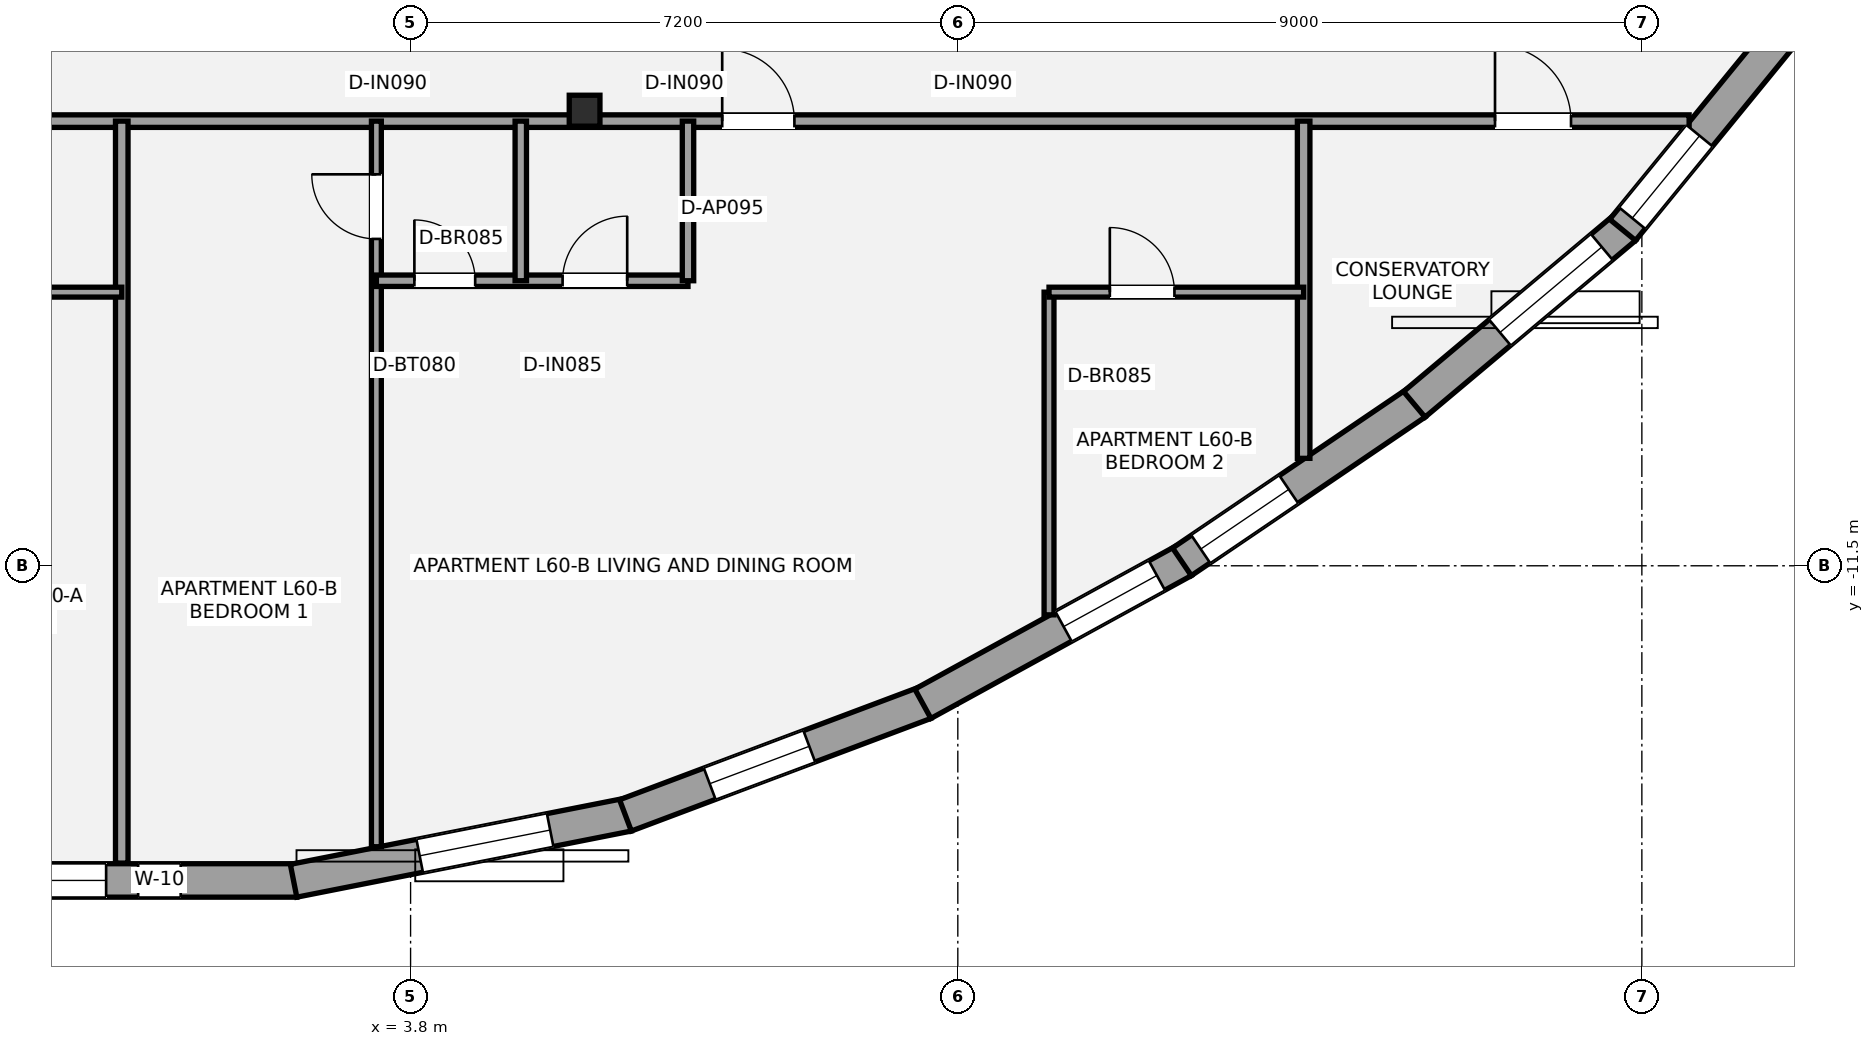
"""IFC4 building model, lengths in metres.
Left out: names, types, materials, properties, quantities, classifications, styles, units other than length and angle.
Written with IfcOpenShell. Run it as: python <this file> out.ifc"""

import sys

from ifc_helpers import new_model, si_unit, direction, frame, frame_2d, origin, origin_2d, place, context, subcontext, project, spatial, rectangle, i_section, extrude, element, fill, save


model = new_model("IFC4")
c1 = context("Model", 3, precision=1e-05, world=origin(), true_north=direction((0.0, 1.0)))
c2 = subcontext(c1, "Body", "Model", "MODEL_VIEW")
j1 = project(units=[si_unit("LENGTHUNIT", "METRE"), si_unit("PLANEANGLEUNIT", "RADIAN")], contexts=[c1])
p1 = place(None, origin())
s1 = spatial("IfcSite", under=j1, at=p1, CompositionType="ELEMENT")
p2 = place(p1, origin())
s2 = spatial("IfcBuilding", under=s1, at=p2, CompositionType="ELEMENT")
p3 = place(p2, frame((0.0, 0.0, 216.3)))
s3 = spatial("IfcBuildingStorey", under=s2, at=p3, CompositionType="ELEMENT", Elevation=216.3)
p4 = place(p3, frame((6.09, -5.513, 0.0), z_axis=(0.0, 0.0, 1.0), x_axis=(1.0, 0.0, 0.0)))
e1 = element("IfcColumn", 1, at=p4, inside=s3, PredefinedType="COLUMN", context=c2, shape_type="SweptSolid", body=[
    extrude(i_section(OverallWidth=0.404, OverallDepth=0.407, WebThickness=0.027, FlangeThickness=0.044, at=origin_2d()), origin(), (0.0, 0.0, 1.0), 3.15),
])
p5 = place(p3, frame((2.303, -15.64, 0.0), z_axis=(0.0, 0.0, 1.0), x_axis=(-1.0, 0.0, 0.0)))
e2 = element("IfcWall", 2, at=p5, inside=s3, PredefinedType="STANDARD", context=c2, shape_type="SweptSolid", body=[
    extrude(rectangle(XDim=4.606, YDim=0.44, at=frame_2d((2.303, 0.0))), origin(), (0.0, 0.0, 1.0), 2.336),
])
p6 = place(p5, frame((2.509, 0.0, 0.55)))
e3 = element("IfcOpeningElement", 3, at=p6, cuts=e2, PredefinedType="OPENING", context=c2, shape_type="SweptSolid", body=[
    extrude(rectangle(XDim=1.75, YDim=1.55, at=frame_2d((0.875, 0.775))), frame((0.0, 0.23, 0.0), z_axis=(0.0, -1.0, 0.0), x_axis=(1.0, 0.0, 0.0)), (0.0, 0.0, 1.0), 0.46),
])
p7 = place(p5, frame((1.528, 0.0, 0.42)))
e4 = element("IfcOpeningElement", 4, at=p7, cuts=e2, PredefinedType="OPENING", context=c2, shape_type="SweptSolid", body=[
    extrude(rectangle(XDim=0.56, YDim=1.15, at=frame_2d((0.28, 0.575))), frame((0.0, 0.23, 0.0), z_axis=(0.0, -1.0, 0.0), x_axis=(1.0, 0.0, 0.0)), (0.0, 0.0, 1.0), 0.46),
])
p8 = place(p3, frame((6.662, -14.774, 0.0), z_axis=(0.0, 0.0, 1.0), x_axis=(-0.981032244947, -0.193844613996, 0.0)))
e5 = element("IfcWall", 5, at=p8, inside=s3, PredefinedType="STANDARD", context=c2, shape_type="SweptSolid", body=[
    extrude(rectangle(XDim=4.486, YDim=0.44, at=frame_2d((2.243, 0.0))), origin(), (0.0, 0.0, 1.0), 2.336),
])
p9 = place(p8, frame((1.045, 0.0, 0.55)))
e6 = element("IfcOpeningElement", 6, at=p9, cuts=e5, PredefinedType="OPENING", context=c2, shape_type="SweptSolid", body=[
    extrude(rectangle(XDim=1.75, YDim=1.55, at=frame_2d((0.875, 0.775))), frame((0.0, 0.23, 0.0), z_axis=(0.0, -1.0, 0.0), x_axis=(1.0, 0.0, 0.0)), (0.0, 0.0, 1.0), 0.46),
])
p10 = place(p3, frame((10.569, -13.302, 0.0), z_axis=(0.0, 0.0, 1.0), x_axis=(-0.936069207768, -0.351815915314, 0.0)))
e7 = element("IfcWall", 7, at=p10, inside=s3, PredefinedType="STANDARD", context=c2, shape_type="SweptSolid", body=[
    extrude(rectangle(XDim=4.211, YDim=0.44, at=frame_2d((2.105, 0.0))), origin(), (0.0, 0.0, 1.0), 2.336),
])
p11 = place(p10, frame((1.627, 0.0, 0.55)))
e8 = element("IfcOpeningElement", 8, at=p11, cuts=e7, PredefinedType="OPENING", context=c2, shape_type="SweptSolid", body=[
    extrude(rectangle(XDim=1.4, YDim=1.55, at=frame_2d((0.7, 0.775))), frame((0.0, 0.23, 0.0), z_axis=(0.0, -1.0, 0.0), x_axis=(1.0, 0.0, 0.0)), (0.0, 0.0, 1.0), 0.46),
])
p12 = place(p3, frame((13.967, -11.437, 0.0), z_axis=(0.0, 0.0, 1.0), x_axis=(-0.87688122565, -0.480707100117, 0.0)))
e9 = element("IfcWall", 9, at=p12, inside=s3, PredefinedType="STANDARD", context=c2, shape_type="SweptSolid", body=[
    extrude(rectangle(XDim=3.908, YDim=0.44, at=frame_2d((1.954, 0.0))), origin(), (0.0, 0.0, 1.0), 2.336),
])
p13 = place(p12, frame((0.396, 0.0, 0.58)))
e10 = element("IfcOpeningElement", 10, at=p13, cuts=e9, PredefinedType="OPENING", context=c2, shape_type="SweptSolid", body=[
    extrude(rectangle(XDim=1.4, YDim=1.55, at=frame_2d((0.7, 0.775))), frame((0.0, 0.23, 0.0), z_axis=(0.0, -1.0, 0.0), x_axis=(1.0, 0.0, 0.0)), (0.0, 0.0, 1.0), 0.46),
])
p14 = place(p3, frame((17.024, -9.362, 0.0), z_axis=(0.0, 0.0, 1.0), x_axis=(-0.827595704154, -0.561324639105, 0.0)))
e11 = element("IfcWall", 11, at=p14, inside=s3, PredefinedType="STANDARD", context=c2, shape_type="SweptSolid", body=[
    extrude(rectangle(XDim=3.715, YDim=0.44, at=frame_2d((1.858, 0.0))), origin(), (0.0, 0.0, 1.0), 2.336),
])
p15 = place(p14, frame((2.017, 0.0, 0.58)))
e12 = element("IfcOpeningElement", 12, at=p15, cuts=e11, PredefinedType="OPENING", context=c2, shape_type="SweptSolid", body=[
    extrude(rectangle(XDim=1.4, YDim=1.55, at=frame_2d((0.7, 0.775))), frame((0.0, 0.23, 0.0), z_axis=(0.0, -1.0, 0.0), x_axis=(1.0, 0.0, 0.0)), (0.0, 0.0, 1.0), 0.46),
])
p16 = place(p3, frame((19.776, -7.052, 0.0), z_axis=(0.0, 0.0, 1.0), x_axis=(-0.766063904081, -0.642764416302, 0.0)))
e13 = element("IfcWall", 13, at=p16, inside=s3, PredefinedType="STANDARD", context=c2, shape_type="SweptSolid", body=[
    extrude(rectangle(XDim=3.615, YDim=0.44, at=frame_2d((1.808, 0.0))), origin(), (0.0, 0.0, 1.0), 2.336),
])
p17 = place(p16, frame((0.396, 0.0, 0.55)))
e14 = element("IfcOpeningElement", 14, at=p17, cuts=e13, PredefinedType="OPENING", context=c2, shape_type="SweptSolid", body=[
    extrude(rectangle(XDim=1.75, YDim=1.55, at=frame_2d((0.875, 0.775))), frame((0.0, 0.23, 0.0), z_axis=(0.0, -1.0, 0.0), x_axis=(1.0, 0.0, 0.0)), (0.0, 0.0, 1.0), 0.46),
])
p18 = place(p3, frame((21.931, -4.408, 0.0), z_axis=(0.0, 0.0, 1.0), x_axis=(-0.632725461905, -0.774376194015, 0.0)))
e15 = element("IfcWall", 15, at=p18, inside=s3, PredefinedType="STANDARD", context=c2, shape_type="SweptSolid", body=[
    extrude(rectangle(XDim=3.452, YDim=0.44, at=frame_2d((1.726, 0.0))), origin(), (0.0, 0.0, 1.0), 2.336),
])
p19 = place(p18, frame((1.852, 0.0, 0.58)))
e16 = element("IfcOpeningElement", 16, at=p19, cuts=e15, PredefinedType="OPENING", context=c2, shape_type="SweptSolid", body=[
    extrude(rectangle(XDim=1.4, YDim=1.55, at=frame_2d((0.7, 0.775))), frame((0.0, 0.23, 0.0), z_axis=(0.0, -1.0, 0.0), x_axis=(1.0, 0.0, 0.0)), (0.0, 0.0, 1.0), 0.46),
])
p20 = place(p3, frame((-20.622, -5.65, 0.0), z_axis=(0.0, 0.0, 1.0), x_axis=(1.0, 0.0, 0.0)))
e17 = element("IfcWall", 17, at=p20, inside=s3, PredefinedType="PARTITIONING", context=c2, shape_type="SweptSolid", body=[
    extrude(rectangle(XDim=41.244, YDim=0.165, at=frame_2d((20.622, 0.0))), origin(), (0.0, 0.0, 1.0), 2.357),
])
p21 = place(p20, frame((1.554, 0.0, 0.0)))
e18 = element("IfcOpeningElement", 18, at=p21, cuts=e17, PredefinedType="OPENING", context=c2, shape_type="SweptSolid", body=[
    extrude(rectangle(XDim=1.0, YDim=2.15, at=frame_2d((0.5, 1.075))), frame((0.0, 0.093, 0.0), z_axis=(0.0, -1.0, 0.0), x_axis=(1.0, 0.0, 0.0)), (0.0, 0.0, 1.0), 0.185),
])
p22 = place(p20, frame((38.69, 0.0, 0.0)))
e19 = element("IfcOpeningElement", 19, at=p22, cuts=e17, PredefinedType="OPENING", context=c2, shape_type="SweptSolid", body=[
    extrude(rectangle(XDim=1.0, YDim=2.15, at=frame_2d((0.5, 1.075))), frame((0.0, 0.093, 0.0), z_axis=(0.0, -1.0, 0.0), x_axis=(1.0, 0.0, 0.0)), (0.0, 0.0, 1.0), 0.185),
])
p23 = place(p20, frame((14.932, 0.0, 0.0)))
e20 = element("IfcOpeningElement", 20, at=p23, cuts=e17, PredefinedType="OPENING", context=c2, shape_type="SweptSolid", body=[
    extrude(rectangle(XDim=0.95, YDim=2.15, at=frame_2d((0.475, 1.075))), frame((0.0, 0.093, 0.0), z_axis=(0.0, -1.0, 0.0), x_axis=(1.0, 0.0, 0.0)), (0.0, 0.0, 1.0), 0.185),
])
p24 = place(p20, frame((28.522, 0.0, 0.0)))
e21 = element("IfcOpeningElement", 21, at=p24, cuts=e17, PredefinedType="OPENING", context=c2, shape_type="SweptSolid", body=[
    extrude(rectangle(XDim=0.95, YDim=2.15, at=frame_2d((0.475, 1.075))), frame((0.0, 0.093, 0.0), z_axis=(0.0, -1.0, 0.0), x_axis=(1.0, 0.0, 0.0)), (0.0, 0.0, 1.0), 0.185),
])
p25 = place(p3, frame((15.55, -10.086, 0.0), z_axis=(0.0, 0.0, 1.0), x_axis=(0.0, 1.0, 0.0)))
e22 = element("IfcWall", 22, at=p25, inside=s3, PredefinedType="PARTITIONING", context=c2, shape_type="SweptSolid", body=[
    extrude(rectangle(XDim=4.437, YDim=0.165, at=frame_2d((2.218, 0.0))), origin(), (0.0, 0.0, 1.0), 2.97),
])
p26 = place(p3, frame((0.0, -15.412, 0.0), z_axis=(0.0, 0.0, 1.0), x_axis=(0.0, 1.0, 0.0)))
e23 = element("IfcWall", 23, at=p26, inside=s3, PredefinedType="PARTITIONING", context=c2, shape_type="SweptSolid", body=[
    extrude(rectangle(XDim=9.762, YDim=0.165, at=frame_2d((4.881, 0.0))), origin(), (0.0, 0.0, 1.0), 2.423),
])
p27 = place(p3, frame((-3.35, -7.9, 0.0), z_axis=(0.0, 0.0, 1.0), x_axis=(1.0, 0.0, 0.0)))
e24 = element("IfcWall", 24, at=p27, inside=s3, PredefinedType="PARTITIONING", context=c2, shape_type="SweptSolid", body=[
    extrude(rectangle(XDim=3.35, YDim=0.13, at=frame_2d((1.675, 0.0))), origin(), (0.0, 0.0, 1.0), 2.423),
])
p28 = place(p27, frame((0.8, 0.0, 0.0)))
e25 = element("IfcOpeningElement", 25, at=p28, cuts=e24, PredefinedType="OPENING", context=c2, shape_type="SweptSolid", body=[
    extrude(rectangle(XDim=0.85, YDim=2.1, at=frame_2d((0.425, 1.05))), frame((0.0, 0.075, 0.0), z_axis=(0.0, -1.0, 0.0), x_axis=(1.0, 0.0, 0.0)), (0.0, 0.0, 1.0), 0.15),
])
p29 = place(p3, frame((3.35, -15.196, 0.0), z_axis=(0.0, 0.0, 1.0), x_axis=(0.0, 1.0, 0.0)))
e26 = element("IfcWall", 26, at=p29, inside=s3, PredefinedType="PARTITIONING", context=c2, shape_type="SweptSolid", body=[
    extrude(rectangle(XDim=9.546, YDim=0.13, at=frame_2d((4.773, 0.0))), origin(), (0.0, 0.0, 1.0), 2.423),
])
p30 = place(p29, frame((7.996, 0.0, 0.0)))
e27 = element("IfcOpeningElement", 27, at=p30, cuts=e26, PredefinedType="OPENING", context=c2, shape_type="SweptSolid", body=[
    extrude(rectangle(XDim=0.85, YDim=2.1, at=frame_2d((0.425, 1.05))), frame((0.0, 0.075, 0.0), z_axis=(0.0, -1.0, 0.0), x_axis=(1.0, 0.0, 0.0)), (0.0, 0.0, 1.0), 0.15),
])
p31 = place(p3, frame((3.35, -7.75, 0.0), z_axis=(0.0, 0.0, 1.0), x_axis=(1.0, 0.0, 0.0)))
e28 = element("IfcWall", 28, at=p31, inside=s3, PredefinedType="PLUMBINGWALL", context=c2, shape_type="SweptSolid", body=[
    extrude(rectangle(XDim=4.1, YDim=0.15, at=frame_2d((2.05, 0.0))), origin(), (0.0, 0.0, 1.0), 2.97),
])
p32 = place(p31, frame((0.5, 0.0, 0.0)))
e29 = element("IfcOpeningElement", 29, at=p32, cuts=e28, PredefinedType="OPENING", context=c2, shape_type="SweptSolid", body=[
    extrude(rectangle(XDim=0.8, YDim=2.1, at=frame_2d((0.4, 1.05))), frame((0.0, 0.085, 0.0), z_axis=(0.0, -1.0, 0.0), x_axis=(1.0, 0.0, 0.0)), (0.0, 0.0, 1.0), 0.17),
])
p33 = place(p31, frame((2.45, 0.0, 0.0)))
e30 = element("IfcOpeningElement", 30, at=p33, cuts=e28, PredefinedType="OPENING", context=c2, shape_type="SweptSolid", body=[
    extrude(rectangle(XDim=0.85, YDim=2.1, at=frame_2d((0.425, 1.05))), frame((0.0, 0.085, 0.0), z_axis=(0.0, -1.0, 0.0), x_axis=(1.0, 0.0, 0.0)), (0.0, 0.0, 1.0), 0.17),
])
for number, where, z_axis, x_axis in (
    (31, (5.25, -7.75, 0.0), (0.0, 0.0, 1.0), (0.0, 1.0, 0.0)),
    (32, (7.45, -7.75, 0.0), (0.0, 0.0, 1.0), (0.0, 1.0, 0.0)),
):
    element("IfcWall", number, at=place(p3, frame(where, z_axis=z_axis, x_axis=x_axis)), inside=s3, PredefinedType="PLUMBINGWALL", context=c2, shape_type="SweptSolid", body=[
        extrude(rectangle(XDim=2.1, YDim=0.15, at=frame_2d((1.05, 0.0))), origin(), (0.0, 0.0, 1.0), 2.97),
    ])
p34 = place(p3, frame((12.2, -12.146, 0.0), z_axis=(0.0, 0.0, 1.0), x_axis=(0.0, 1.0, 0.0)))
e33 = element("IfcWall", 33, at=p34, inside=s3, PredefinedType="PARTITIONING", context=c2, shape_type="SweptSolid", body=[
    extrude(rectangle(XDim=4.246, YDim=0.13, at=frame_2d((2.123, 0.0))), origin(), (0.0, 0.0, 1.0), 2.423),
])
p35 = place(p3, frame((12.2, -7.9, 0.0), z_axis=(0.0, 0.0, 1.0), x_axis=(1.0, 0.0, 0.0)))
e34 = element("IfcWall", 34, at=p35, inside=s3, PredefinedType="PARTITIONING", context=c2, shape_type="SweptSolid", body=[
    extrude(rectangle(XDim=3.35, YDim=0.13, at=frame_2d((1.675, 0.0))), origin(), (0.0, 0.0, 1.0), 2.423),
])
p36 = place(p35, frame((0.8, 0.0, 0.0)))
e35 = element("IfcOpeningElement", 35, at=p36, cuts=e34, PredefinedType="OPENING", context=c2, shape_type="SweptSolid", body=[
    extrude(rectangle(XDim=0.85, YDim=2.1, at=frame_2d((0.425, 1.05))), frame((0.0, 0.075, 0.0), z_axis=(0.0, -1.0, 0.0), x_axis=(1.0, 0.0, 0.0)), (0.0, 0.0, 1.0), 0.15),
])
p37 = place(p6, origin())
e36 = element("IfcWindow", 36, at=p37, inside=s3, PartitioningType="SINGLE_PANEL", PredefinedType="WINDOW", context=c2, shape_type="SweptSolid", body=[
    extrude(rectangle(XDim=1.75, YDim=1.55, at=frame_2d((0.875, 0.775))), frame((0.0, -0.01, 0.0), z_axis=(0.0, -1.0, 0.0), x_axis=(1.0, 0.0, 0.0)), (0.0, 0.0, 1.0), 0.06),
])
fill(e3, e36)
p38 = place(p9, origin())
e37 = element("IfcWindow", 37, at=p38, inside=s3, PartitioningType="SINGLE_PANEL", PredefinedType="WINDOW", context=c2, shape_type="SweptSolid", body=[
    extrude(rectangle(XDim=1.75, YDim=1.55, at=frame_2d((0.875, 0.775))), frame((0.0, -0.01, 0.0), z_axis=(0.0, -1.0, 0.0), x_axis=(1.0, 0.0, 0.0)), (0.0, 0.0, 1.0), 0.06),
])
fill(e6, e37)
p39 = place(p11, origin())
e38 = element("IfcWindow", 38, at=p39, inside=s3, PartitioningType="SINGLE_PANEL", PredefinedType="WINDOW", context=c2, shape_type="SweptSolid", body=[
    extrude(rectangle(XDim=1.4, YDim=1.55, at=frame_2d((0.7, 0.775))), frame((0.0, -0.01, 0.0), z_axis=(0.0, -1.0, 0.0), x_axis=(1.0, 0.0, 0.0)), (0.0, 0.0, 1.0), 0.06),
])
fill(e8, e38)
p40 = place(p13, origin())
e39 = element("IfcWindow", 39, at=p40, inside=s3, PartitioningType="SINGLE_PANEL", PredefinedType="WINDOW", context=c2, shape_type="SweptSolid", body=[
    extrude(rectangle(XDim=1.4, YDim=1.55, at=frame_2d((0.7, 0.775))), frame((0.0, -0.01, 0.0), z_axis=(0.0, -1.0, 0.0), x_axis=(1.0, 0.0, 0.0)), (0.0, 0.0, 1.0), 0.06),
])
fill(e10, e39)
p41 = place(p15, origin())
e40 = element("IfcWindow", 40, at=p41, inside=s3, PartitioningType="SINGLE_PANEL", PredefinedType="WINDOW", context=c2, shape_type="SweptSolid", body=[
    extrude(rectangle(XDim=1.4, YDim=1.55, at=frame_2d((0.7, 0.775))), frame((0.0, -0.01, 0.0), z_axis=(0.0, -1.0, 0.0), x_axis=(1.0, 0.0, 0.0)), (0.0, 0.0, 1.0), 0.06),
])
fill(e12, e40)
p42 = place(p17, origin())
e41 = element("IfcWindow", 41, at=p42, inside=s3, PartitioningType="SINGLE_PANEL", PredefinedType="WINDOW", context=c2, shape_type="SweptSolid", body=[
    extrude(rectangle(XDim=1.75, YDim=1.55, at=frame_2d((0.875, 0.775))), frame((0.0, -0.01, 0.0), z_axis=(0.0, -1.0, 0.0), x_axis=(1.0, 0.0, 0.0)), (0.0, 0.0, 1.0), 0.06),
])
fill(e14, e41)
p43 = place(p19, origin())
e42 = element("IfcWindow", 42, at=p43, inside=s3, PartitioningType="SINGLE_PANEL", PredefinedType="WINDOW", context=c2, shape_type="SweptSolid", body=[
    extrude(rectangle(XDim=1.4, YDim=1.55, at=frame_2d((0.7, 0.775))), frame((0.0, -0.01, 0.0), z_axis=(0.0, -1.0, 0.0), x_axis=(1.0, 0.0, 0.0)), (0.0, 0.0, 1.0), 0.06),
])
fill(e16, e42)
p44 = place(p7, origin())
e43 = element("IfcWindow", 43, at=p44, inside=s3, PartitioningType="SINGLE_PANEL", PredefinedType="WINDOW", context=c2, shape_type="SweptSolid", body=[
    extrude(rectangle(XDim=0.56, YDim=1.15, at=frame_2d((0.28, 0.575))), frame((0.0, -0.01, 0.0), z_axis=(0.0, -1.0, 0.0), x_axis=(1.0, 0.0, 0.0)), (0.0, 0.0, 1.0), 0.06),
])
fill(e4, e43)
p45 = place(p22, origin())
e44 = element("IfcDoor", 44, at=p45, inside=s3, OperationType="SINGLE_SWING_LEFT", PredefinedType="DOOR", context=c2, shape_type="SweptSolid", body=[
    extrude(rectangle(XDim=1.0, YDim=2.15, at=frame_2d((0.5, 1.075))), frame((0.0, 0.025, 0.0), z_axis=(0.0, -1.0, 0.0), x_axis=(1.0, 0.0, 0.0)), (0.0, 0.0, 1.0), 0.05),
])
fill(e19, e44)
p46 = place(p30, origin())
e45 = element("IfcDoor", 45, at=p46, inside=s3, OperationType="SINGLE_SWING_RIGHT", PredefinedType="DOOR", context=c2, shape_type="SweptSolid", body=[
    extrude(rectangle(XDim=0.85, YDim=2.1, at=frame_2d((0.425, 1.05))), frame((0.0, 0.025, 0.0), z_axis=(0.0, -1.0, 0.0), x_axis=(1.0, 0.0, 0.0)), (0.0, 0.0, 1.0), 0.05),
])
fill(e27, e45)
p47 = place(p32, origin())
e46 = element("IfcDoor", 46, at=p47, inside=s3, OperationType="SINGLE_SWING_LEFT", PredefinedType="DOOR", context=c2, shape_type="SweptSolid", body=[
    extrude(rectangle(XDim=0.8, YDim=2.1, at=frame_2d((0.4, 1.05))), frame((0.0, 0.025, 0.0), z_axis=(0.0, -1.0, 0.0), x_axis=(1.0, 0.0, 0.0)), (0.0, 0.0, 1.0), 0.05),
])
fill(e29, e46)
p48 = place(p33, origin())
e47 = element("IfcDoor", 47, at=p48, inside=s3, OperationType="SINGLE_SWING_RIGHT", PredefinedType="DOOR", context=c2, shape_type="SweptSolid", body=[
    extrude(rectangle(XDim=0.85, YDim=2.1, at=frame_2d((0.425, 1.05))), frame((0.0, 0.025, 0.0), z_axis=(0.0, -1.0, 0.0), x_axis=(1.0, 0.0, 0.0)), (0.0, 0.0, 1.0), 0.05),
])
fill(e30, e47)
p49 = place(p24, origin())
e48 = element("IfcDoor", 48, at=p49, inside=s3, OperationType="SINGLE_SWING_LEFT", PredefinedType="DOOR", context=c2, shape_type="SweptSolid", body=[
    extrude(rectangle(XDim=0.95, YDim=2.15, at=frame_2d((0.475, 1.075))), frame((0.0, 0.025, 0.0), z_axis=(0.0, -1.0, 0.0), x_axis=(1.0, 0.0, 0.0)), (0.0, 0.0, 1.0), 0.05),
])
fill(e21, e48)
p50 = place(p36, origin())
e49 = element("IfcDoor", 49, at=p50, inside=s3, OperationType="SINGLE_SWING_LEFT", PredefinedType="DOOR", context=c2, shape_type="SweptSolid", body=[
    extrude(rectangle(XDim=0.85, YDim=2.1, at=frame_2d((0.425, 1.05))), frame((0.0, 0.025, 0.0), z_axis=(0.0, -1.0, 0.0), x_axis=(1.0, 0.0, 0.0)), (0.0, 0.0, 1.0), 0.05),
])
fill(e35, e49)
save(model, sys.argv[1])
